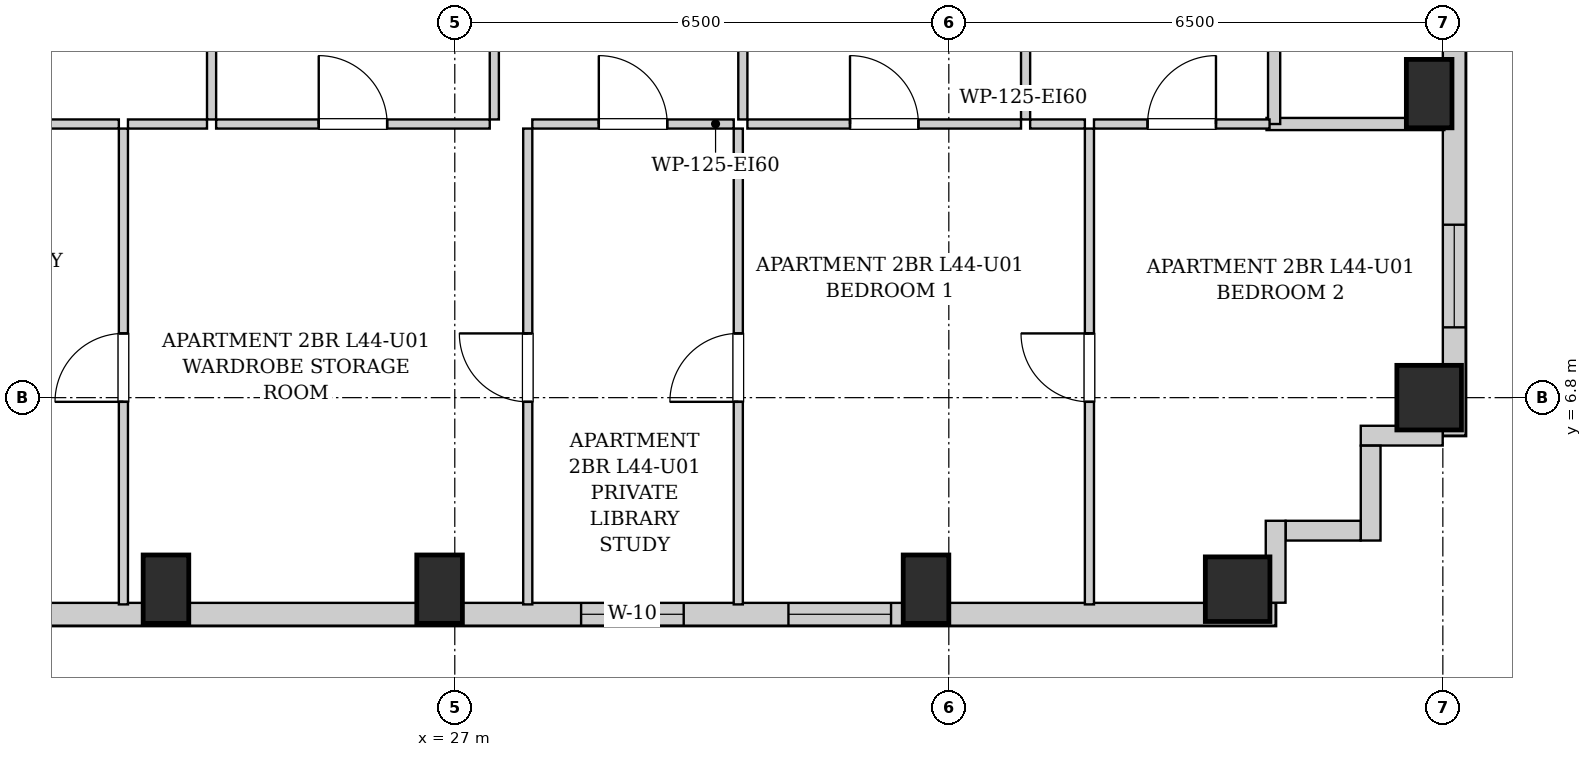
"""IFC4 building model, lengths in metres.
Left out: names, types, materials, properties, quantities, classifications, styles, units other than length and angle.
Written with IfcOpenShell. Run it as: python <this file> out.ifc"""

import sys

from ifc_helpers import new_model, si_unit, direction, frame, frame_2d, origin, origin_2d, place, context, subcontext, project, spatial, rectangle, extrude, element, fill, save


model = new_model("IFC4")
c1 = context("Model", 3, precision=1e-05, world=origin(), true_north=direction((0.0, 1.0)))
c2 = subcontext(c1, "Body", "Model", "MODEL_VIEW")
j1 = project(units=[si_unit("LENGTHUNIT", "METRE"), si_unit("PLANEANGLEUNIT", "RADIAN")], contexts=[c1])
p1 = place(None, origin())
s1 = spatial("IfcSite", under=j1, at=p1, CompositionType="ELEMENT")
p2 = place(p1, origin())
s2 = spatial("IfcBuilding", under=s1, at=p2, CompositionType="ELEMENT")
p3 = place(p2, frame((0.0, 0.0, 153.65)))
s3 = spatial("IfcBuildingStorey", under=s2, at=p3, CompositionType="ELEMENT", Elevation=153.65)
for number, where, z_axis, x_axis in (
    (1, (23.2, 4.28, 0.0), (0.0, 0.0, 1.0), (1.0, 0.0, 0.0)),
    (2, (26.8, 4.28, 0.0), (0.0, 0.0, 1.0), (1.0, 0.0, 0.0)),
    (3, (33.2, 4.28, 0.0), (0.0, 0.0, 1.0), (1.0, 0.0, 0.0)),
):
    element("IfcColumn", number, at=place(p3, frame(where, z_axis=z_axis, x_axis=x_axis)), inside=s3, PredefinedType="COLUMN", context=c2, shape_type="SweptSolid", body=[
        extrude(rectangle(XDim=0.6, YDim=0.9, at=origin_2d()), origin(), (0.0, 0.0, 1.0), 3.25),
    ])
for number, where, z_axis, x_axis in (
    (4, (37.3, 4.28, 0.0), (0.0, 0.0, 1.0), (1.0, 0.0, 0.0)),
    (5, (39.82, 6.8, 0.0), (0.0, 0.0, 1.0), (1.0, 0.0, 0.0)),
):
    element("IfcColumn", number, at=place(p3, frame(where, z_axis=z_axis, x_axis=x_axis)), inside=s3, PredefinedType="COLUMN", context=c2, shape_type="SweptSolid", body=[
        extrude(rectangle(XDim=0.85, YDim=0.85, at=origin_2d()), origin(), (0.0, 0.0, 1.0), 3.25),
    ])
p4 = place(p3, frame((39.82, 10.8, 0.0), z_axis=(0.0, 0.0, 1.0), x_axis=(1.0, 0.0, 0.0)))
e6 = element("IfcColumn", 6, at=p4, inside=s3, PredefinedType="COLUMN", context=c2, shape_type="SweptSolid", body=[
    extrude(rectangle(XDim=0.6, YDim=0.9, at=origin_2d()), origin(), (0.0, 0.0, 1.0), 3.25),
])
p5 = place(p3, frame((40.15, 40.8, 0.0), z_axis=(0.0, 0.0, 1.0), x_axis=(0.0, -1.0, 0.0)))
e7 = element("IfcWall", 7, at=p5, inside=s3, PredefinedType="SOLIDWALL", context=c2, shape_type="SweptSolid", body=[
    extrude(rectangle(XDim=34.5, YDim=0.3, at=frame_2d((17.25, 0.0))), origin(), (0.0, 0.0, 1.0), 2.99),
])
p6 = place(p5, frame((31.725, 0.0, 0.55)))
e8 = element("IfcOpeningElement", 8, at=p6, cuts=e7, PredefinedType="OPENING", context=c2, shape_type="SweptSolid", body=[
    extrude(rectangle(XDim=1.35, YDim=1.2, at=frame_2d((0.675, 0.6))), frame((0.0, 0.16, 0.0), z_axis=(0.0, -1.0, 0.0), x_axis=(1.0, 0.0, 0.0)), (0.0, 0.0, 1.0), 0.32),
])
p7 = place(p5, frame((22.8, 0.0, 0.55)))
e9 = element("IfcOpeningElement", 9, at=p7, cuts=e7, PredefinedType="OPENING", context=c2, shape_type="SweptSolid", body=[
    extrude(rectangle(XDim=1.35, YDim=1.2, at=frame_2d((0.675, 0.6))), frame((0.0, 0.16, 0.0), z_axis=(0.0, -1.0, 0.0), x_axis=(1.0, 0.0, 0.0)), (0.0, 0.0, 1.0), 0.32),
])
p8 = place(p5, frame((13.425, 0.0, 0.55)))
e10 = element("IfcOpeningElement", 10, at=p8, cuts=e7, PredefinedType="OPENING", context=c2, shape_type="SweptSolid", body=[
    extrude(rectangle(XDim=1.35, YDim=1.2, at=frame_2d((0.675, 0.6))), frame((0.0, 0.16, 0.0), z_axis=(0.0, -1.0, 0.0), x_axis=(1.0, 0.0, 0.0)), (0.0, 0.0, 1.0), 0.32),
])
p9 = place(p3, frame((37.8, 3.95, 0.0), z_axis=(0.0, 0.0, 1.0), x_axis=(-1.0, 0.0, 0.0)))
e11 = element("IfcWall", 11, at=p9, inside=s3, PredefinedType="SOLIDWALL", context=c2, shape_type="SweptSolid", body=[
    extrude(rectangle(XDim=19.95, YDim=0.3, at=frame_2d((9.975, 0.0))), origin(), (0.0, 0.0, 1.0), 2.99),
])
p10 = place(p9, frame((16.555, 0.0, 0.55)))
e12 = element("IfcOpeningElement", 12, at=p10, cuts=e11, PredefinedType="OPENING", context=c2, shape_type="SweptSolid", body=[
    extrude(rectangle(XDim=1.35, YDim=1.2, at=frame_2d((0.675, 0.6))), frame((0.0, 0.16, 0.0), z_axis=(0.0, -1.0, 0.0), x_axis=(1.0, 0.0, 0.0)), (0.0, 0.0, 1.0), 0.32),
])
p11 = place(p9, frame((7.788, 0.0, 0.55)))
e13 = element("IfcOpeningElement", 13, at=p11, cuts=e11, PredefinedType="OPENING", context=c2, shape_type="SweptSolid", body=[
    extrude(rectangle(XDim=1.35, YDim=1.2, at=frame_2d((0.675, 0.6))), frame((0.0, 0.16, 0.0), z_axis=(0.0, -1.0, 0.0), x_axis=(1.0, 0.0, 0.0)), (0.0, 0.0, 1.0), 0.32),
])
p12 = place(p9, frame((5.06, 0.0, 0.55)))
e14 = element("IfcOpeningElement", 14, at=p12, cuts=e11, PredefinedType="OPENING", context=c2, shape_type="SweptSolid", body=[
    extrude(rectangle(XDim=1.35, YDim=1.2, at=frame_2d((0.675, 0.6))), frame((0.0, 0.16, 0.0), z_axis=(0.0, -1.0, 0.0), x_axis=(1.0, 0.0, 0.0)), (0.0, 0.0, 1.0), 0.32),
])
p13 = place(p3, frame((39.998, 6.3, 0.0), z_axis=(0.0, 0.0, 1.0), x_axis=(-1.0, 0.0, 0.0)))
e15 = element("IfcWall", 15, at=p13, inside=s3, PredefinedType="SOLIDWALL", context=c2, shape_type="SweptSolid", body=[
    extrude(rectangle(XDim=1.078, YDim=0.26, at=frame_2d((0.539, 0.0))), origin(), (0.0, 0.0, 1.0), 2.99),
])
p14 = place(p3, frame((39.05, 6.168, 0.0), z_axis=(0.0, 0.0, 1.0), x_axis=(0.0, -1.0, 0.0)))
e16 = element("IfcWall", 16, at=p14, inside=s3, PredefinedType="SOLIDWALL", context=c2, shape_type="SweptSolid", body=[
    extrude(rectangle(XDim=1.248, YDim=0.26, at=frame_2d((0.624, 0.0))), origin(), (0.0, 0.0, 1.0), 2.99),
])
p15 = place(p3, frame((38.918, 5.05, 0.0), z_axis=(0.0, 0.0, 1.0), x_axis=(-1.0, 0.0, 0.0)))
e17 = element("IfcWall", 17, at=p15, inside=s3, PredefinedType="SOLIDWALL", context=c2, shape_type="SweptSolid", body=[
    extrude(rectangle(XDim=0.986, YDim=0.26, at=frame_2d((0.493, 0.0))), origin(), (0.0, 0.0, 1.0), 2.99),
])
p16 = place(p3, frame((37.8, 5.18, 0.0), z_axis=(0.0, 0.0, 1.0), x_axis=(0.0, -1.0, 0.0)))
e18 = element("IfcWall", 18, at=p16, inside=s3, PredefinedType="SOLIDWALL", context=c2, shape_type="SweptSolid", body=[
    extrude(rectangle(XDim=1.078, YDim=0.26, at=frame_2d((0.539, 0.0))), origin(), (0.0, 0.0, 1.0), 2.99),
])
p17 = place(p3, frame((37.68, 10.4, 0.0), z_axis=(0.0, 0.0, 1.0), x_axis=(1.0, 0.0, 0.0)))
e19 = element("IfcWall", 19, at=p17, inside=s3, PredefinedType="PARTITIONING", context=c2, shape_type="SweptSolid", body=[
    extrude(rectangle(XDim=2.34, YDim=0.16, at=frame_2d((1.17, 0.0))), origin(), (0.0, 0.0, 1.0), 2.99),
])
p18 = place(p3, frame((37.78, 10.4, 0.0), z_axis=(0.0, 0.0, 1.0), x_axis=(0.0, 1.0, 0.0)))
e20 = element("IfcWall", 20, at=p18, inside=s3, PredefinedType="PARTITIONING", context=c2, shape_type="SweptSolid", body=[
    extrude(rectangle(XDim=2.91, YDim=0.16, at=frame_2d((1.455, 0.0))), origin(), (0.0, 0.0, 1.0), 2.99),
])
p19 = place(p3, frame((23.8, 10.46, 0.0), z_axis=(0.0, 0.0, 1.0), x_axis=(0.0, 1.0, 0.0)))
e21 = element("IfcWall", 21, at=p19, inside=s3, PredefinedType="PARTITIONING", context=c2, shape_type="SweptSolid", body=[
    extrude(rectangle(XDim=2.85, YDim=0.12, at=frame_2d((1.425, 0.0))), origin(), (0.0, 0.0, 1.0), 2.99),
])
p20 = place(p19, frame((0.975, 0.0, 0.0)))
e22 = element("IfcOpeningElement", 22, at=p20, cuts=e21, PredefinedType="OPENING", context=c2, shape_type="SweptSolid", body=[
    extrude(rectangle(XDim=0.9, YDim=2.05, at=frame_2d((0.45, 1.025))), frame((0.0, 0.07, 0.0), z_axis=(0.0, -1.0, 0.0), x_axis=(1.0, 0.0, 0.0)), (0.0, 0.0, 1.0), 0.14),
])
for number, where, z_axis, x_axis in (
    (23, (21.54, 10.4, 0.0), (0.0, 0.0, 1.0), (1.0, 0.0, 0.0)),
    (24, (22.7, 10.4, 0.0), (0.0, 0.0, 1.0), (1.0, 0.0, 0.0)),
):
    element("IfcWall", number, at=place(p3, frame(where, z_axis=z_axis, x_axis=x_axis)), inside=s3, PredefinedType="PARTITIONING", context=c2, shape_type="SweptSolid", body=[
        extrude(rectangle(XDim=1.04, YDim=0.12, at=frame_2d((0.52, 0.0))), origin(), (0.0, 0.0, 1.0), 2.99),
    ])
p21 = place(p3, frame((27.52, 10.46, 0.0), z_axis=(0.0, 0.0, 1.0), x_axis=(0.0, 1.0, 0.0)))
e25 = element("IfcWall", 25, at=p21, inside=s3, PredefinedType="PARTITIONING", context=c2, shape_type="SweptSolid", body=[
    extrude(rectangle(XDim=2.85, YDim=0.12, at=frame_2d((1.425, 0.0))), origin(), (0.0, 0.0, 1.0), 2.99),
])
p22 = place(p21, frame((0.975, 0.0, 0.0)))
e26 = element("IfcOpeningElement", 26, at=p22, cuts=e25, PredefinedType="OPENING", context=c2, shape_type="SweptSolid", body=[
    extrude(rectangle(XDim=0.9, YDim=2.05, at=frame_2d((0.45, 1.025))), frame((0.0, 0.07, 0.0), z_axis=(0.0, -1.0, 0.0), x_axis=(1.0, 0.0, 0.0)), (0.0, 0.0, 1.0), 0.14),
])
p23 = place(p3, frame((23.86, 10.4, 0.0), z_axis=(0.0, 0.0, 1.0), x_axis=(1.0, 0.0, 0.0)))
e27 = element("IfcWall", 27, at=p23, inside=s3, PredefinedType="PARTITIONING", context=c2, shape_type="SweptSolid", body=[
    extrude(rectangle(XDim=3.6, YDim=0.12, at=frame_2d((1.8, 0.0))), origin(), (0.0, 0.0, 1.0), 2.99),
])
p24 = place(p23, frame((1.35, 0.0, 0.0)))
e28 = element("IfcOpeningElement", 28, at=p24, cuts=e27, PredefinedType="OPENING", context=c2, shape_type="SweptSolid", body=[
    extrude(rectangle(XDim=0.9, YDim=2.05, at=frame_2d((0.45, 1.025))), frame((0.0, 0.07, 0.0), z_axis=(0.0, -1.0, 0.0), x_axis=(1.0, 0.0, 0.0)), (0.0, 0.0, 1.0), 0.14),
])
p25 = place(p3, frame((30.79, 10.46, 0.0), z_axis=(0.0, 0.0, 1.0), x_axis=(0.0, 1.0, 0.0)))
e29 = element("IfcWall", 29, at=p25, inside=s3, PredefinedType="PARTITIONING", context=c2, shape_type="SweptSolid", body=[
    extrude(rectangle(XDim=2.85, YDim=0.12, at=frame_2d((1.425, 0.0))), origin(), (0.0, 0.0, 1.0), 2.99),
])
p26 = place(p25, frame((0.975, 0.0, 0.0)))
e30 = element("IfcOpeningElement", 30, at=p26, cuts=e29, PredefinedType="OPENING", context=c2, shape_type="SweptSolid", body=[
    extrude(rectangle(XDim=0.9, YDim=2.05, at=frame_2d((0.45, 1.025))), frame((0.0, 0.07, 0.0), z_axis=(0.0, -1.0, 0.0), x_axis=(1.0, 0.0, 0.0)), (0.0, 0.0, 1.0), 0.14),
])
p27 = place(p3, frame((28.02, 10.4, 0.0), z_axis=(0.0, 0.0, 1.0), x_axis=(1.0, 0.0, 0.0)))
e31 = element("IfcWall", 31, at=p27, inside=s3, PredefinedType="PARTITIONING", context=c2, shape_type="SweptSolid", body=[
    extrude(rectangle(XDim=2.65, YDim=0.12, at=frame_2d((1.325, 0.0))), origin(), (0.0, 0.0, 1.0), 2.99),
])
p28 = place(p27, frame((0.875, 0.0, 0.0)))
e32 = element("IfcOpeningElement", 32, at=p28, cuts=e31, PredefinedType="OPENING", context=c2, shape_type="SweptSolid", body=[
    extrude(rectangle(XDim=0.9, YDim=2.05, at=frame_2d((0.45, 1.025))), frame((0.0, 0.07, 0.0), z_axis=(0.0, -1.0, 0.0), x_axis=(1.0, 0.0, 0.0)), (0.0, 0.0, 1.0), 0.14),
])
p29 = place(p3, frame((34.51, 10.46, 0.0), z_axis=(0.0, 0.0, 1.0), x_axis=(0.0, 1.0, 0.0)))
e33 = element("IfcWall", 33, at=p29, inside=s3, PredefinedType="PARTITIONING", context=c2, shape_type="SweptSolid", body=[
    extrude(rectangle(XDim=2.85, YDim=0.12, at=frame_2d((1.425, 0.0))), origin(), (0.0, 0.0, 1.0), 2.99),
])
p30 = place(p29, frame((0.975, 0.0, 0.0)))
e34 = element("IfcOpeningElement", 34, at=p30, cuts=e33, PredefinedType="OPENING", context=c2, shape_type="SweptSolid", body=[
    extrude(rectangle(XDim=0.9, YDim=2.05, at=frame_2d((0.45, 1.025))), frame((0.0, 0.07, 0.0), z_axis=(0.0, -1.0, 0.0), x_axis=(1.0, 0.0, 0.0)), (0.0, 0.0, 1.0), 0.14),
])
p31 = place(p3, frame((30.85, 10.4, 0.0), z_axis=(0.0, 0.0, 1.0), x_axis=(1.0, 0.0, 0.0)))
e35 = element("IfcWall", 35, at=p31, inside=s3, PredefinedType="PARTITIONING", context=c2, shape_type="SweptSolid", body=[
    extrude(rectangle(XDim=3.6, YDim=0.12, at=frame_2d((1.8, 0.0))), origin(), (0.0, 0.0, 1.0), 2.99),
])
p32 = place(p31, frame((1.35, 0.0, 0.0)))
e36 = element("IfcOpeningElement", 36, at=p32, cuts=e35, PredefinedType="OPENING", context=c2, shape_type="SweptSolid", body=[
    extrude(rectangle(XDim=0.9, YDim=2.05, at=frame_2d((0.45, 1.025))), frame((0.0, 0.07, 0.0), z_axis=(0.0, -1.0, 0.0), x_axis=(1.0, 0.0, 0.0)), (0.0, 0.0, 1.0), 0.14),
])
p33 = place(p3, frame((34.57, 10.4, 0.0), z_axis=(0.0, 0.0, 1.0), x_axis=(1.0, 0.0, 0.0)))
e37 = element("IfcWall", 37, at=p33, inside=s3, PredefinedType="PARTITIONING", context=c2, shape_type="SweptSolid", body=[
    extrude(rectangle(XDim=0.72, YDim=0.12, at=frame_2d((0.36, 0.0))), origin(), (0.0, 0.0, 1.0), 2.99),
])
p34 = place(p3, frame((35.41, 10.4, 0.0), z_axis=(0.0, 0.0, 1.0), x_axis=(1.0, 0.0, 0.0)))
e38 = element("IfcWall", 38, at=p34, inside=s3, PredefinedType="PARTITIONING", context=c2, shape_type="SweptSolid", body=[
    extrude(rectangle(XDim=2.31, YDim=0.12, at=frame_2d((1.155, 0.0))), origin(), (0.0, 0.0, 1.0), 2.99),
])
p35 = place(p34, frame((0.705, 0.0, 0.0)))
e39 = element("IfcOpeningElement", 39, at=p35, cuts=e38, PredefinedType="OPENING", context=c2, shape_type="SweptSolid", body=[
    extrude(rectangle(XDim=0.9, YDim=2.05, at=frame_2d((0.45, 1.025))), frame((0.0, 0.07, 0.0), z_axis=(0.0, -1.0, 0.0), x_axis=(1.0, 0.0, 0.0)), (0.0, 0.0, 1.0), 0.14),
])
p36 = place(p3, frame((22.64, 4.08, 0.0), z_axis=(0.0, 0.0, 1.0), x_axis=(0.0, 1.0, 0.0)))
e40 = element("IfcWall", 40, at=p36, inside=s3, PredefinedType="PARTITIONING", context=c2, shape_type="SweptSolid", body=[
    extrude(rectangle(XDim=6.26, YDim=0.12, at=frame_2d((3.13, 0.0))), origin(), (0.0, 0.0, 1.0), 2.99),
])
p37 = place(p36, frame((2.665, 0.0, 0.0)))
e41 = element("IfcOpeningElement", 41, at=p37, cuts=e40, PredefinedType="OPENING", context=c2, shape_type="SweptSolid", body=[
    extrude(rectangle(XDim=0.9, YDim=2.05, at=frame_2d((0.45, 1.025))), frame((0.0, 0.07, 0.0), z_axis=(0.0, -1.0, 0.0), x_axis=(1.0, 0.0, 0.0)), (0.0, 0.0, 1.0), 0.14),
])
p38 = place(p3, frame((27.96, 4.08, 0.0), z_axis=(0.0, 0.0, 1.0), x_axis=(0.0, 1.0, 0.0)))
e42 = element("IfcWall", 42, at=p38, inside=s3, PredefinedType="PARTITIONING", context=c2, shape_type="SweptSolid", body=[
    extrude(rectangle(XDim=6.26, YDim=0.12, at=frame_2d((3.13, 0.0))), origin(), (0.0, 0.0, 1.0), 2.99),
])
p39 = place(p38, frame((2.665, 0.0, 0.0)))
e43 = element("IfcOpeningElement", 43, at=p39, cuts=e42, PredefinedType="OPENING", context=c2, shape_type="SweptSolid", body=[
    extrude(rectangle(XDim=0.9, YDim=2.05, at=frame_2d((0.45, 1.025))), frame((0.0, 0.07, 0.0), z_axis=(0.0, -1.0, 0.0), x_axis=(1.0, 0.0, 0.0)), (0.0, 0.0, 1.0), 0.14),
])
p40 = place(p3, frame((30.73, 4.08, 0.0), z_axis=(0.0, 0.0, 1.0), x_axis=(0.0, 1.0, 0.0)))
e44 = element("IfcWall", 44, at=p40, inside=s3, PredefinedType="PARTITIONING", context=c2, shape_type="SweptSolid", body=[
    extrude(rectangle(XDim=6.26, YDim=0.12, at=frame_2d((3.13, 0.0))), origin(), (0.0, 0.0, 1.0), 2.99),
])
p41 = place(p40, frame((2.665, 0.0, 0.0)))
e45 = element("IfcOpeningElement", 45, at=p41, cuts=e44, PredefinedType="OPENING", context=c2, shape_type="SweptSolid", body=[
    extrude(rectangle(XDim=0.9, YDim=2.05, at=frame_2d((0.45, 1.025))), frame((0.0, 0.07, 0.0), z_axis=(0.0, -1.0, 0.0), x_axis=(1.0, 0.0, 0.0)), (0.0, 0.0, 1.0), 0.14),
])
p42 = place(p3, frame((35.35, 4.08, 0.0), z_axis=(0.0, 0.0, 1.0), x_axis=(0.0, 1.0, 0.0)))
e46 = element("IfcWall", 46, at=p42, inside=s3, PredefinedType="PARTITIONING", context=c2, shape_type="SweptSolid", body=[
    extrude(rectangle(XDim=6.26, YDim=0.12, at=frame_2d((3.13, 0.0))), origin(), (0.0, 0.0, 1.0), 2.99),
])
p43 = place(p42, frame((2.665, 0.0, 0.0)))
e47 = element("IfcOpeningElement", 47, at=p43, cuts=e46, PredefinedType="OPENING", context=c2, shape_type="SweptSolid", body=[
    extrude(rectangle(XDim=0.9, YDim=2.05, at=frame_2d((0.45, 1.025))), frame((0.0, 0.07, 0.0), z_axis=(0.0, -1.0, 0.0), x_axis=(1.0, 0.0, 0.0)), (0.0, 0.0, 1.0), 0.14),
])
p44 = place(p24, origin())
e48 = element("IfcDoor", 48, at=p44, inside=s3, OperationType="SINGLE_SWING_LEFT", PredefinedType="DOOR", context=c2, shape_type="SweptSolid", body=[
    extrude(rectangle(XDim=0.9, YDim=2.05, at=frame_2d((0.45, 1.025))), frame((0.0, 0.025, 0.0), z_axis=(0.0, -1.0, 0.0), x_axis=(1.0, 0.0, 0.0)), (0.0, 0.0, 1.0), 0.05),
])
fill(e28, e48)
p45 = place(p28, origin())
e49 = element("IfcDoor", 49, at=p45, inside=s3, OperationType="SINGLE_SWING_LEFT", PredefinedType="DOOR", context=c2, shape_type="SweptSolid", body=[
    extrude(rectangle(XDim=0.9, YDim=2.05, at=frame_2d((0.45, 1.025))), frame((0.0, 0.025, 0.0), z_axis=(0.0, -1.0, 0.0), x_axis=(1.0, 0.0, 0.0)), (0.0, 0.0, 1.0), 0.05),
])
fill(e32, e49)
p46 = place(p32, origin())
e50 = element("IfcDoor", 50, at=p46, inside=s3, OperationType="SINGLE_SWING_LEFT", PredefinedType="DOOR", context=c2, shape_type="SweptSolid", body=[
    extrude(rectangle(XDim=0.9, YDim=2.05, at=frame_2d((0.45, 1.025))), frame((0.0, 0.025, 0.0), z_axis=(0.0, -1.0, 0.0), x_axis=(1.0, 0.0, 0.0)), (0.0, 0.0, 1.0), 0.05),
])
fill(e36, e50)
p47 = place(p35, origin())
e51 = element("IfcDoor", 51, at=p47, inside=s3, OperationType="SINGLE_SWING_RIGHT", PredefinedType="DOOR", context=c2, shape_type="SweptSolid", body=[
    extrude(rectangle(XDim=0.9, YDim=2.05, at=frame_2d((0.45, 1.025))), frame((0.0, 0.025, 0.0), z_axis=(0.0, -1.0, 0.0), x_axis=(1.0, 0.0, 0.0)), (0.0, 0.0, 1.0), 0.05),
])
fill(e39, e51)
p48 = place(p37, origin())
e52 = element("IfcDoor", 52, at=p48, inside=s3, OperationType="SINGLE_SWING_LEFT", PredefinedType="DOOR", context=c2, shape_type="SweptSolid", body=[
    extrude(rectangle(XDim=0.9, YDim=2.05, at=frame_2d((0.45, 1.025))), frame((0.0, 0.025, 0.0), z_axis=(0.0, -1.0, 0.0), x_axis=(1.0, 0.0, 0.0)), (0.0, 0.0, 1.0), 0.05),
])
fill(e41, e52)
p49 = place(p39, origin())
e53 = element("IfcDoor", 53, at=p49, inside=s3, OperationType="SINGLE_SWING_RIGHT", PredefinedType="DOOR", context=c2, shape_type="SweptSolid", body=[
    extrude(rectangle(XDim=0.9, YDim=2.05, at=frame_2d((0.45, 1.025))), frame((0.0, 0.025, 0.0), z_axis=(0.0, -1.0, 0.0), x_axis=(1.0, 0.0, 0.0)), (0.0, 0.0, 1.0), 0.05),
])
fill(e43, e53)
p50 = place(p41, origin())
e54 = element("IfcDoor", 54, at=p50, inside=s3, OperationType="SINGLE_SWING_LEFT", PredefinedType="DOOR", context=c2, shape_type="SweptSolid", body=[
    extrude(rectangle(XDim=0.9, YDim=2.05, at=frame_2d((0.45, 1.025))), frame((0.0, 0.025, 0.0), z_axis=(0.0, -1.0, 0.0), x_axis=(1.0, 0.0, 0.0)), (0.0, 0.0, 1.0), 0.05),
])
fill(e45, e54)
p51 = place(p43, origin())
e55 = element("IfcDoor", 55, at=p51, inside=s3, OperationType="SINGLE_SWING_RIGHT", PredefinedType="DOOR", context=c2, shape_type="SweptSolid", body=[
    extrude(rectangle(XDim=0.9, YDim=2.05, at=frame_2d((0.45, 1.025))), frame((0.0, 0.025, 0.0), z_axis=(0.0, -1.0, 0.0), x_axis=(1.0, 0.0, 0.0)), (0.0, 0.0, 1.0), 0.05),
])
fill(e47, e55)
p52 = place(p11, origin())
e56 = element("IfcWindow", 56, at=p52, inside=s3, PartitioningType="SINGLE_PANEL", PredefinedType="WINDOW", context=c2, shape_type="SweptSolid", body=[
    extrude(rectangle(XDim=1.35, YDim=1.2, at=frame_2d((0.675, 0.6))), frame((0.0, 0.03, 0.0), z_axis=(0.0, -1.0, 0.0), x_axis=(1.0, 0.0, 0.0)), (0.0, 0.0, 1.0), 0.06),
])
fill(e13, e56)
p53 = place(p12, origin())
e57 = element("IfcWindow", 57, at=p53, inside=s3, PartitioningType="SINGLE_PANEL", PredefinedType="WINDOW", context=c2, shape_type="SweptSolid", body=[
    extrude(rectangle(XDim=1.35, YDim=1.2, at=frame_2d((0.675, 0.6))), frame((0.0, 0.03, 0.0), z_axis=(0.0, -1.0, 0.0), x_axis=(1.0, 0.0, 0.0)), (0.0, 0.0, 1.0), 0.06),
])
fill(e14, e57)
p54 = place(p6, origin())
e58 = element("IfcWindow", 58, at=p54, inside=s3, PartitioningType="SINGLE_PANEL", PredefinedType="WINDOW", context=c2, shape_type="SweptSolid", body=[
    extrude(rectangle(XDim=1.35, YDim=1.2, at=frame_2d((0.675, 0.6))), frame((0.0, 0.03, 0.0), z_axis=(0.0, -1.0, 0.0), x_axis=(1.0, 0.0, 0.0)), (0.0, 0.0, 1.0), 0.06),
])
fill(e8, e58)
save(model, sys.argv[1])
